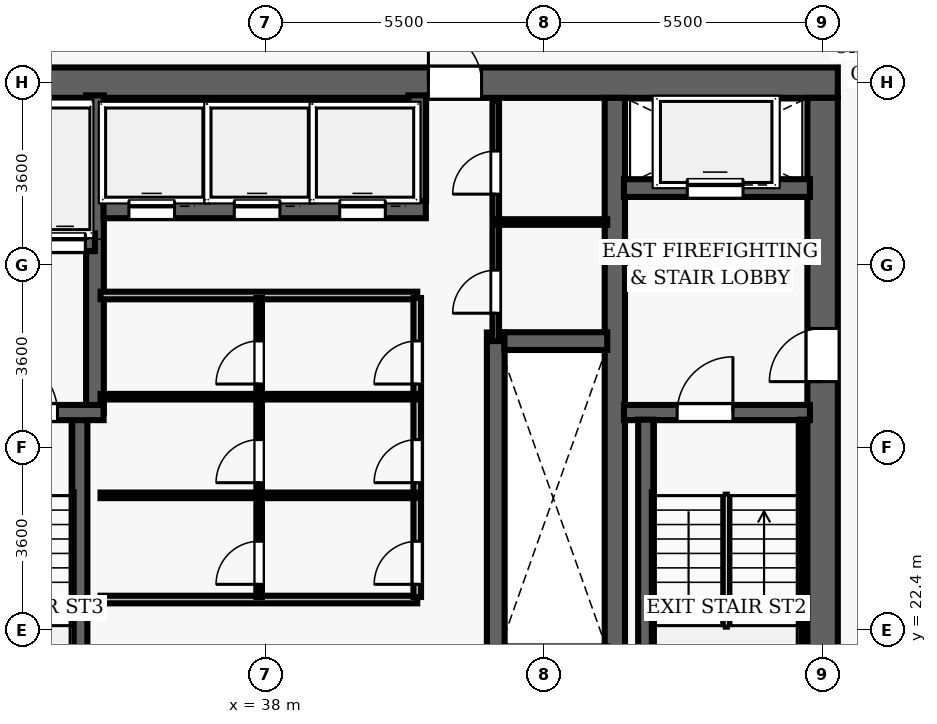
"""IFC4 building model, lengths in metres.
Left out: names, types, materials, properties, quantities, classifications, styles, units other than length and angle.
Written with IfcOpenShell. Run it as: python <this file> out.ifc"""

import sys

from ifc_helpers import new_model, si_unit, direction, frame, frame_2d, origin, place, context, subcontext, project, spatial, rectangle, extrude, element, fill, save


model = new_model("IFC4")
c1 = context("Model", 3, precision=1e-05, world=origin(), true_north=direction((0.0, 1.0)))
c2 = subcontext(c1, "Body", "Model", "MODEL_VIEW")
j1 = project(units=[si_unit("LENGTHUNIT", "METRE"), si_unit("PLANEANGLEUNIT", "RADIAN")], contexts=[c1])
p1 = place(None, origin())
s1 = spatial("IfcSite", under=j1, at=p1, CompositionType="ELEMENT")
p2 = place(p1, origin())
s2 = spatial("IfcBuilding", under=s1, at=p2, CompositionType="ELEMENT")
p3 = place(p2, frame((0.0, 0.0, 90.4)))
s3 = spatial("IfcBuildingStorey", under=s2, at=p3, CompositionType="ELEMENT", Elevation=90.4)
p4 = place(p3, frame((26.7, 33.2, 0.0), z_axis=(0.0, 0.0, 1.0), x_axis=(1.0, 0.0, 0.0)))
e1 = element("IfcWall", 1, at=p4, inside=s3, PredefinedType="SHEAR", context=c2, shape_type="SweptSolid", body=[
    extrude(rectangle(XDim=22.6, YDim=0.6, at=frame_2d((11.3, 0.0))), origin(), (0.0, 0.0, 1.0), 3.5),
])
p5 = place(p4, frame((4.62, 0.0, 0.0)))
e2 = element("IfcOpeningElement", 2, at=p5, cuts=e1, PredefinedType="OPENING", context=c2, shape_type="SweptSolid", body=[
    extrude(rectangle(XDim=1.05, YDim=2.15, at=frame_2d((0.525, 1.075))), frame((0.0, 0.31, 0.0), z_axis=(0.0, -1.0, 0.0), x_axis=(1.0, 0.0, 0.0)), (0.0, 0.0, 1.0), 0.62),
])
p6 = place(p4, frame((14.52, 0.0, 0.0)))
e3 = element("IfcOpeningElement", 3, at=p6, cuts=e1, PredefinedType="OPENING", context=c2, shape_type="SweptSolid", body=[
    extrude(rectangle(XDim=1.05, YDim=2.15, at=frame_2d((0.525, 1.075))), frame((0.0, 0.31, 0.0), z_axis=(0.0, -1.0, 0.0), x_axis=(1.0, 0.0, 0.0)), (0.0, 0.0, 1.0), 0.62),
])
p7 = place(p3, frame((49.0, 19.1, 0.0), z_axis=(0.0, 0.0, 1.0), x_axis=(0.0, 1.0, 0.0)))
e4 = element("IfcWall", 4, at=p7, inside=s3, PredefinedType="SHEAR", context=c2, shape_type="SweptSolid", body=[
    extrude(rectangle(XDim=13.8, YDim=0.6, at=frame_2d((6.9, 0.0))), origin(), (0.0, 0.0, 1.0), 3.5),
])
p8 = place(p7, frame((8.2, 0.0, 0.0)))
e5 = element("IfcOpeningElement", 5, at=p8, cuts=e4, PredefinedType="OPENING", context=c2, shape_type="SweptSolid", body=[
    extrude(rectangle(XDim=1.05, YDim=2.15, at=frame_2d((0.525, 1.075))), frame((0.0, 0.31, 0.0), z_axis=(0.0, -1.0, 0.0), x_axis=(1.0, 0.0, 0.0)), (0.0, 0.0, 1.0), 0.62),
])
p9 = place(p3, frame((44.9, 19.1, 0.0), z_axis=(0.0, 0.0, 1.0), x_axis=(0.0, 1.0, 0.0)))
e6 = element("IfcWall", 6, at=p9, inside=s3, PredefinedType="SHEAR", context=c2, shape_type="SweptSolid", body=[
    extrude(rectangle(XDim=13.8, YDim=0.4, at=frame_2d((6.9, 0.0))), origin(), (0.0, 0.0, 1.0), 3.5),
])
p10 = place(p3, frame((45.08, 26.69, 0.0), z_axis=(0.0, 0.0, 1.0), x_axis=(1.0, 0.0, 0.0)))
e7 = element("IfcWall", 7, at=p10, inside=s3, PredefinedType="SHEAR", context=c2, shape_type="SweptSolid", body=[
    extrude(rectangle(XDim=3.67, YDim=0.3, at=frame_2d((1.835, 0.0))), origin(), (0.0, 0.0, 1.0), 3.5),
])
p11 = place(p10, frame((1.05, 0.0, 0.0)))
e8 = element("IfcOpeningElement", 8, at=p11, cuts=e7, PredefinedType="OPENING", context=c2, shape_type="SweptSolid", body=[
    extrude(rectangle(XDim=1.1, YDim=2.15, at=frame_2d((0.55, 1.075))), frame((0.0, 0.16, 0.0), z_axis=(0.0, -1.0, 0.0), x_axis=(1.0, 0.0, 0.0)), (0.0, 0.0, 1.0), 0.32),
])
p12 = place(p3, frame((45.51, 19.05, 0.0), z_axis=(0.0, 0.0, 1.0), x_axis=(0.0, 1.0, 0.0)))
e9 = element("IfcWall", 9, at=p12, inside=s3, PredefinedType="SHEAR", context=c2, shape_type="SweptSolid", body=[
    extrude(rectangle(XDim=7.5, YDim=0.3, at=frame_2d((3.75, 0.0))), origin(), (0.0, 0.0, 1.0), 3.5),
])
p13 = place(p3, frame((48.605, 19.1, 0.0), z_axis=(0.0, 0.0, 1.0), x_axis=(0.0, 1.0, 0.0)))
e10 = element("IfcWall", 10, at=p13, inside=s3, PredefinedType="SHEAR", context=c2, shape_type="SweptSolid", body=[
    extrude(rectangle(XDim=7.45, YDim=0.12, at=frame_2d((3.725, 0.0))), origin(), (0.0, 0.0, 1.0), 3.5),
])
p14 = place(p3, frame((45.08, 31.12, 0.0), z_axis=(0.0, 0.0, 1.0), x_axis=(1.0, 0.0, 0.0)))
e11 = element("IfcWall", 11, at=p14, inside=s3, PredefinedType="SHEAR", context=c2, shape_type="SweptSolid", body=[
    extrude(rectangle(XDim=3.67, YDim=0.35, at=frame_2d((1.835, 0.0))), origin(), (0.0, 0.0, 1.0), 2.6),
])
p15 = place(p14, frame((1.25, 0.0, 0.0)))
e12 = element("IfcOpeningElement", 12, at=p15, cuts=e11, PredefinedType="OPENING", context=c2, shape_type="SweptSolid", body=[
    extrude(rectangle(XDim=1.1, YDim=2.15, at=frame_2d((0.55, 1.075))), frame((0.0, 0.185, 0.0), z_axis=(0.0, -1.0, 0.0), x_axis=(1.0, 0.0, 0.0)), (0.0, 0.0, 1.0), 0.37),
])
p16 = place(p3, frame((34.34, 19.05, 0.0), z_axis=(0.0, 0.0, 1.0), x_axis=(0.0, 1.0, 0.0)))
e13 = element("IfcWall", 13, at=p16, inside=s3, PredefinedType="SHEAR", context=c2, shape_type="SweptSolid", body=[
    extrude(rectangle(XDim=7.5, YDim=0.3, at=frame_2d((3.75, 0.0))), origin(), (0.0, 0.0, 1.0), 3.5),
])
p17 = place(p3, frame((34.64, 26.69, 0.0), z_axis=(0.0, 0.0, 1.0), x_axis=(0.0, 1.0, 0.0)))
e14 = element("IfcWall", 14, at=p17, inside=s3, PredefinedType="SHEAR", context=c2, shape_type="SweptSolid", body=[
    extrude(rectangle(XDim=6.26, YDim=0.35, at=frame_2d((3.13, 0.0))), origin(), (0.0, 0.0, 1.0), 3.5),
])
p18 = place(p3, frame((31.25, 26.69, 0.0), z_axis=(0.0, 0.0, 1.0), x_axis=(1.0, 0.0, 0.0)))
e15 = element("IfcWall", 15, at=p18, inside=s3, PredefinedType="SHEAR", context=c2, shape_type="SweptSolid", body=[
    extrude(rectangle(XDim=3.56, YDim=0.3, at=frame_2d((1.78, 0.0))), origin(), (0.0, 0.0, 1.0), 3.5),
])
p19 = place(p18, frame((1.55, 0.0, 0.0)))
e16 = element("IfcOpeningElement", 16, at=p19, cuts=e15, PredefinedType="OPENING", context=c2, shape_type="SweptSolid", body=[
    extrude(rectangle(XDim=1.1, YDim=2.15, at=frame_2d((0.55, 1.075))), frame((0.0, 0.16, 0.0), z_axis=(0.0, -1.0, 0.0), x_axis=(1.0, 0.0, 0.0)), (0.0, 0.0, 1.0), 0.32),
])
p20 = place(p3, frame((32.23, 30.05, 0.0), z_axis=(0.0, 0.0, 1.0), x_axis=(1.0, 0.0, 0.0)))
e17 = element("IfcWall", 17, at=p20, inside=s3, PredefinedType="SHEAR", context=c2, shape_type="SweptSolid", body=[
    extrude(rectangle(XDim=2.41, YDim=0.35, at=frame_2d((1.205, 0.0))), origin(), (0.0, 0.0, 1.0), 2.6),
])
p21 = place(p20, frame((0.42, 0.0, 0.0)))
e18 = element("IfcOpeningElement", 18, at=p21, cuts=e17, PredefinedType="OPENING", context=c2, shape_type="SweptSolid", body=[
    extrude(rectangle(XDim=0.8, YDim=2.15, at=frame_2d((0.4, 1.075))), frame((0.0, 0.185, 0.0), z_axis=(0.0, -1.0, 0.0), x_axis=(1.0, 0.0, 0.0)), (0.0, 0.0, 1.0), 0.37),
])
p22 = place(p20, frame((1.42, 0.0, 0.0)))
e19 = element("IfcOpeningElement", 19, at=p22, cuts=e17, PredefinedType="OPENING", context=c2, shape_type="SweptSolid", body=[
    extrude(rectangle(XDim=0.8, YDim=2.15, at=frame_2d((0.4, 1.075))), frame((0.0, 0.185, 0.0), z_axis=(0.0, -1.0, 0.0), x_axis=(1.0, 0.0, 0.0)), (0.0, 0.0, 1.0), 0.37),
])
p23 = place(p3, frame((42.55, 21.73, 0.0), z_axis=(0.0, 0.0, 1.0), x_axis=(0.0, 1.0, 0.0)))
e20 = element("IfcWall", 20, at=p23, inside=s3, PredefinedType="SHEAR", context=c2, shape_type="SweptSolid", body=[
    extrude(rectangle(XDim=6.54, YDim=0.35, at=frame_2d((3.27, 0.0))), origin(), (0.0, 0.0, 1.0), 2.6),
])
p24 = place(p3, frame((42.72, 28.1, 0.0), z_axis=(0.0, 0.0, 1.0), x_axis=(1.0, 0.0, 0.0)))
e21 = element("IfcWall", 21, at=p24, inside=s3, PredefinedType="SHEAR", context=c2, shape_type="SweptSolid", body=[
    extrude(rectangle(XDim=2.03, YDim=0.35, at=frame_2d((1.015, 0.0))), origin(), (0.0, 0.0, 1.0), 2.6),
])
p25 = place(p3, frame((34.81, 30.7, 0.0), z_axis=(0.0, 0.0, 1.0), x_axis=(1.0, 0.0, 0.0)))
e22 = element("IfcWall", 22, at=p25, inside=s3, PredefinedType="SHEAR", context=c2, shape_type="SweptSolid", body=[
    extrude(rectangle(XDim=6.36, YDim=0.35, at=frame_2d((3.18, 0.0))), origin(), (0.0, 0.0, 1.0), 2.6),
])
p26 = place(p25, frame((0.5, 0.0, 0.0)))
e23 = element("IfcOpeningElement", 23, at=p26, cuts=e22, PredefinedType="OPENING", context=c2, shape_type="SweptSolid", body=[
    extrude(rectangle(XDim=0.9, YDim=2.15, at=frame_2d((0.45, 1.075))), frame((0.0, 0.185, 0.0), z_axis=(0.0, -1.0, 0.0), x_axis=(1.0, 0.0, 0.0)), (0.0, 0.0, 1.0), 0.37),
])
p27 = place(p25, frame((2.58, 0.0, 0.0)))
e24 = element("IfcOpeningElement", 24, at=p27, cuts=e22, PredefinedType="OPENING", context=c2, shape_type="SweptSolid", body=[
    extrude(rectangle(XDim=0.9, YDim=2.15, at=frame_2d((0.45, 1.075))), frame((0.0, 0.185, 0.0), z_axis=(0.0, -1.0, 0.0), x_axis=(1.0, 0.0, 0.0)), (0.0, 0.0, 1.0), 0.37),
])
p28 = place(p25, frame((4.66, 0.0, 0.0)))
e25 = element("IfcOpeningElement", 25, at=p28, cuts=e22, PredefinedType="OPENING", context=c2, shape_type="SweptSolid", body=[
    extrude(rectangle(XDim=0.9, YDim=2.15, at=frame_2d((0.45, 1.075))), frame((0.0, 0.185, 0.0), z_axis=(0.0, -1.0, 0.0), x_axis=(1.0, 0.0, 0.0)), (0.0, 0.0, 1.0), 0.37),
])
p29 = place(p3, frame((41.0, 30.87, 0.0), z_axis=(0.0, 0.0, 1.0), x_axis=(0.0, 1.0, 0.0)))
e26 = element("IfcWall", 26, at=p29, inside=s3, PredefinedType="SHEAR", context=c2, shape_type="SweptSolid", body=[
    extrude(rectangle(XDim=2.08, YDim=0.35, at=frame_2d((1.04, 0.0))), origin(), (0.0, 0.0, 1.0), 2.6),
])
for number, where, z_axis, x_axis in (
    (27, (34.75, 29.0, 0.0), (0.0, 0.0, 1.0), (1.0, 0.0, 0.0)),
    (28, (34.75, 23.0, 0.0), (0.0, 0.0, 1.0), (1.0, 0.0, 0.0)),
):
    element("IfcWall", number, at=place(p3, frame(where, z_axis=z_axis, x_axis=x_axis)), inside=s3, PredefinedType="PARTITIONING", context=c2, shape_type="SweptSolid", body=[
        extrude(rectangle(XDim=6.25, YDim=0.15, at=frame_2d((3.125, 0.0))), origin(), (0.0, 0.0, 1.0), 2.6),
    ])
p30 = place(p3, frame((41.0, 23.05, 0.0), z_axis=(0.0, 0.0, 1.0), x_axis=(0.0, 1.0, 0.0)))
e29 = element("IfcWall", 29, at=p30, inside=s3, PredefinedType="PARTITIONING", context=c2, shape_type="SweptSolid", body=[
    extrude(rectangle(XDim=5.9, YDim=0.15, at=frame_2d((2.95, 0.0))), origin(), (0.0, 0.0, 1.0), 2.6),
])
p31 = place(p30, frame((0.25, 0.0, 0.0)))
e30 = element("IfcOpeningElement", 30, at=p31, cuts=e29, PredefinedType="OPENING", context=c2, shape_type="SweptSolid", body=[
    extrude(rectangle(XDim=0.85, YDim=2.1, at=frame_2d((0.425, 1.05))), frame((0.0, 0.085, 0.0), z_axis=(0.0, -1.0, 0.0), x_axis=(1.0, 0.0, 0.0)), (0.0, 0.0, 1.0), 0.17),
])
p32 = place(p30, frame((2.256, 0.0, 0.0)))
e31 = element("IfcOpeningElement", 31, at=p32, cuts=e29, PredefinedType="OPENING", context=c2, shape_type="SweptSolid", body=[
    extrude(rectangle(XDim=0.85, YDim=2.1, at=frame_2d((0.425, 1.05))), frame((0.0, 0.085, 0.0), z_axis=(0.0, -1.0, 0.0), x_axis=(1.0, 0.0, 0.0)), (0.0, 0.0, 1.0), 0.17),
])
p33 = place(p30, frame((4.203, 0.0, 0.0)))
e32 = element("IfcOpeningElement", 32, at=p33, cuts=e29, PredefinedType="OPENING", context=c2, shape_type="SweptSolid", body=[
    extrude(rectangle(XDim=0.85, YDim=2.1, at=frame_2d((0.425, 1.05))), frame((0.0, 0.085, 0.0), z_axis=(0.0, -1.0, 0.0), x_axis=(1.0, 0.0, 0.0)), (0.0, 0.0, 1.0), 0.17),
])
p34 = place(p3, frame((37.88, 23.05, 0.0), z_axis=(0.0, 0.0, 1.0), x_axis=(0.0, 1.0, 0.0)))
e33 = element("IfcWall", 33, at=p34, inside=s3, PredefinedType="PARTITIONING", context=c2, shape_type="SweptSolid", body=[
    extrude(rectangle(XDim=5.9, YDim=0.11, at=frame_2d((2.95, 0.0))), origin(), (0.0, 0.0, 1.0), 2.6),
])
p35 = place(p34, frame((0.25, 0.0, 0.0)))
e34 = element("IfcOpeningElement", 34, at=p35, cuts=e33, PredefinedType="OPENING", context=c2, shape_type="SweptSolid", body=[
    extrude(rectangle(XDim=0.85, YDim=2.1, at=frame_2d((0.425, 1.05))), frame((0.0, 0.065, 0.0), z_axis=(0.0, -1.0, 0.0), x_axis=(1.0, 0.0, 0.0)), (0.0, 0.0, 1.0), 0.13),
])
p36 = place(p34, frame((2.256, 0.0, 0.0)))
e35 = element("IfcOpeningElement", 35, at=p36, cuts=e33, PredefinedType="OPENING", context=c2, shape_type="SweptSolid", body=[
    extrude(rectangle(XDim=0.85, YDim=2.1, at=frame_2d((0.425, 1.05))), frame((0.0, 0.065, 0.0), z_axis=(0.0, -1.0, 0.0), x_axis=(1.0, 0.0, 0.0)), (0.0, 0.0, 1.0), 0.13),
])
p37 = place(p34, frame((4.203, 0.0, 0.0)))
e36 = element("IfcOpeningElement", 36, at=p37, cuts=e33, PredefinedType="OPENING", context=c2, shape_type="SweptSolid", body=[
    extrude(rectangle(XDim=0.85, YDim=2.1, at=frame_2d((0.425, 1.05))), frame((0.0, 0.065, 0.0), z_axis=(0.0, -1.0, 0.0), x_axis=(1.0, 0.0, 0.0)), (0.0, 0.0, 1.0), 0.13),
])
for number, where, z_axis, x_axis in (
    (37, (34.75, 25.056, 0.0), (0.0, 0.0, 1.0), (1.0, 0.0, 0.0)),
    (38, (34.75, 27.003, 0.0), (0.0, 0.0, 1.0), (1.0, 0.0, 0.0)),
):
    element("IfcWall", number, at=place(p3, frame(where, z_axis=z_axis, x_axis=x_axis)), inside=s3, PredefinedType="PARTITIONING", context=c2, shape_type="SweptSolid", body=[
        extrude(rectangle(XDim=6.25, YDim=0.11, at=frame_2d((3.125, 0.0))), origin(), (0.0, 0.0, 1.0), 2.6),
    ])
p38 = place(p3, frame((42.55, 28.1, 0.0), z_axis=(0.0, 0.0, 1.0), x_axis=(0.0, 1.0, 0.0)))
e39 = element("IfcWall", 39, at=p38, inside=s3, PredefinedType="PARTITIONING", context=c2, shape_type="SweptSolid", body=[
    extrude(rectangle(XDim=4.75, YDim=0.13, at=frame_2d((2.375, 0.0))), origin(), (0.0, 0.0, 1.0), 2.6),
])
p39 = place(p38, frame((0.55, 0.0, 0.0)))
e40 = element("IfcOpeningElement", 40, at=p39, cuts=e39, PredefinedType="OPENING", context=c2, shape_type="SweptSolid", body=[
    extrude(rectangle(XDim=0.85, YDim=2.1, at=frame_2d((0.425, 1.05))), frame((0.0, 0.075, 0.0), z_axis=(0.0, -1.0, 0.0), x_axis=(1.0, 0.0, 0.0)), (0.0, 0.0, 1.0), 0.15),
])
p40 = place(p38, frame((2.9, 0.0, 0.0)))
e41 = element("IfcOpeningElement", 41, at=p40, cuts=e39, PredefinedType="OPENING", context=c2, shape_type="SweptSolid", body=[
    extrude(rectangle(XDim=0.85, YDim=2.1, at=frame_2d((0.425, 1.05))), frame((0.0, 0.075, 0.0), z_axis=(0.0, -1.0, 0.0), x_axis=(1.0, 0.0, 0.0)), (0.0, 0.0, 1.0), 0.15),
])
p41 = place(p3, frame((42.55, 30.45, 0.0), z_axis=(0.0, 0.0, 1.0), x_axis=(1.0, 0.0, 0.0)))
e42 = element("IfcWall", 42, at=p41, inside=s3, PredefinedType="PARTITIONING", context=c2, shape_type="SweptSolid", body=[
    extrude(rectangle(XDim=2.2, YDim=0.11, at=frame_2d((1.1, 0.0))), origin(), (0.0, 0.0, 1.0), 2.6),
])
p42 = place(p11, origin())
e43 = element("IfcDoor", 43, at=p42, inside=s3, OperationType="SINGLE_SWING_RIGHT", PredefinedType="DOOR", context=c2, shape_type="SweptSolid", body=[
    extrude(rectangle(XDim=1.1, YDim=2.15, at=frame_2d((0.55, 1.075))), frame((0.0, 0.025, 0.0), z_axis=(0.0, -1.0, 0.0), x_axis=(1.0, 0.0, 0.0)), (0.0, 0.0, 1.0), 0.05),
])
fill(e8, e43)
p43 = place(p8, origin())
e44 = element("IfcDoor", 44, at=p43, inside=s3, OperationType="SINGLE_SWING_LEFT", PredefinedType="DOOR", context=c2, shape_type="SweptSolid", body=[
    extrude(rectangle(XDim=1.05, YDim=2.15, at=frame_2d((0.525, 1.075))), frame((0.0, 0.025, 0.0), z_axis=(0.0, -1.0, 0.0), x_axis=(1.0, 0.0, 0.0)), (0.0, 0.0, 1.0), 0.05),
])
fill(e5, e44)
p44 = place(p19, origin())
e45 = element("IfcDoor", 45, at=p44, inside=s3, OperationType="SINGLE_SWING_LEFT", PredefinedType="DOOR", context=c2, shape_type="SweptSolid", body=[
    extrude(rectangle(XDim=1.1, YDim=2.15, at=frame_2d((0.55, 1.075))), frame((0.0, 0.025, 0.0), z_axis=(0.0, -1.0, 0.0), x_axis=(1.0, 0.0, 0.0)), (0.0, 0.0, 1.0), 0.05),
])
fill(e16, e45)
p45 = place(p6, origin())
e46 = element("IfcDoor", 46, at=p45, inside=s3, OperationType="SINGLE_SWING_LEFT", PredefinedType="DOOR", context=c2, shape_type="SweptSolid", body=[
    extrude(rectangle(XDim=1.05, YDim=2.15, at=frame_2d((0.525, 1.075))), frame((0.0, 0.025, 0.0), z_axis=(0.0, -1.0, 0.0), x_axis=(1.0, 0.0, 0.0)), (0.0, 0.0, 1.0), 0.05),
])
fill(e3, e46)
p46 = place(p31, origin())
e47 = element("IfcDoor", 47, at=p46, inside=s3, OperationType="SINGLE_SWING_LEFT", PredefinedType="DOOR", context=c2, shape_type="SweptSolid", body=[
    extrude(rectangle(XDim=0.85, YDim=2.1, at=frame_2d((0.425, 1.05))), frame((0.0, 0.025, 0.0), z_axis=(0.0, -1.0, 0.0), x_axis=(1.0, 0.0, 0.0)), (0.0, 0.0, 1.0), 0.05),
])
fill(e30, e47)
p47 = place(p35, origin())
e48 = element("IfcDoor", 48, at=p47, inside=s3, OperationType="SINGLE_SWING_LEFT", PredefinedType="DOOR", context=c2, shape_type="SweptSolid", body=[
    extrude(rectangle(XDim=0.85, YDim=2.1, at=frame_2d((0.425, 1.05))), frame((0.0, 0.025, 0.0), z_axis=(0.0, -1.0, 0.0), x_axis=(1.0, 0.0, 0.0)), (0.0, 0.0, 1.0), 0.05),
])
fill(e34, e48)
p48 = place(p32, origin())
e49 = element("IfcDoor", 49, at=p48, inside=s3, OperationType="SINGLE_SWING_LEFT", PredefinedType="DOOR", context=c2, shape_type="SweptSolid", body=[
    extrude(rectangle(XDim=0.85, YDim=2.1, at=frame_2d((0.425, 1.05))), frame((0.0, 0.025, 0.0), z_axis=(0.0, -1.0, 0.0), x_axis=(1.0, 0.0, 0.0)), (0.0, 0.0, 1.0), 0.05),
])
fill(e31, e49)
p49 = place(p36, origin())
e50 = element("IfcDoor", 50, at=p49, inside=s3, OperationType="SINGLE_SWING_LEFT", PredefinedType="DOOR", context=c2, shape_type="SweptSolid", body=[
    extrude(rectangle(XDim=0.85, YDim=2.1, at=frame_2d((0.425, 1.05))), frame((0.0, 0.025, 0.0), z_axis=(0.0, -1.0, 0.0), x_axis=(1.0, 0.0, 0.0)), (0.0, 0.0, 1.0), 0.05),
])
fill(e35, e50)
p50 = place(p33, origin())
e51 = element("IfcDoor", 51, at=p50, inside=s3, OperationType="SINGLE_SWING_LEFT", PredefinedType="DOOR", context=c2, shape_type="SweptSolid", body=[
    extrude(rectangle(XDim=0.85, YDim=2.1, at=frame_2d((0.425, 1.05))), frame((0.0, 0.025, 0.0), z_axis=(0.0, -1.0, 0.0), x_axis=(1.0, 0.0, 0.0)), (0.0, 0.0, 1.0), 0.05),
])
fill(e32, e51)
p51 = place(p37, origin())
e52 = element("IfcDoor", 52, at=p51, inside=s3, OperationType="SINGLE_SWING_LEFT", PredefinedType="DOOR", context=c2, shape_type="SweptSolid", body=[
    extrude(rectangle(XDim=0.85, YDim=2.1, at=frame_2d((0.425, 1.05))), frame((0.0, 0.025, 0.0), z_axis=(0.0, -1.0, 0.0), x_axis=(1.0, 0.0, 0.0)), (0.0, 0.0, 1.0), 0.05),
])
fill(e36, e52)
p52 = place(p39, origin())
e53 = element("IfcDoor", 53, at=p52, inside=s3, OperationType="SINGLE_SWING_LEFT", PredefinedType="DOOR", context=c2, shape_type="SweptSolid", body=[
    extrude(rectangle(XDim=0.85, YDim=2.1, at=frame_2d((0.425, 1.05))), frame((0.0, 0.025, 0.0), z_axis=(0.0, -1.0, 0.0), x_axis=(1.0, 0.0, 0.0)), (0.0, 0.0, 1.0), 0.05),
])
fill(e40, e53)
p53 = place(p40, origin())
e54 = element("IfcDoor", 54, at=p53, inside=s3, OperationType="SINGLE_SWING_LEFT", PredefinedType="DOOR", context=c2, shape_type="SweptSolid", body=[
    extrude(rectangle(XDim=0.85, YDim=2.1, at=frame_2d((0.425, 1.05))), frame((0.0, 0.025, 0.0), z_axis=(0.0, -1.0, 0.0), x_axis=(1.0, 0.0, 0.0)), (0.0, 0.0, 1.0), 0.05),
])
fill(e41, e54)
p54 = place(p26, origin())
e55 = element("IfcDoor", 55, at=p54, inside=s3, OperationType="SLIDING_TO_LEFT", PredefinedType="DOOR", context=c2, shape_type="SweptSolid", body=[
    extrude(rectangle(XDim=0.9, YDim=2.15, at=frame_2d((0.45, 1.075))), frame((0.0, 0.025, 0.0), z_axis=(0.0, -1.0, 0.0), x_axis=(1.0, 0.0, 0.0)), (0.0, 0.0, 1.0), 0.05),
])
fill(e23, e55)
p55 = place(p27, origin())
e56 = element("IfcDoor", 56, at=p55, inside=s3, OperationType="SLIDING_TO_LEFT", PredefinedType="DOOR", context=c2, shape_type="SweptSolid", body=[
    extrude(rectangle(XDim=0.9, YDim=2.15, at=frame_2d((0.45, 1.075))), frame((0.0, 0.025, 0.0), z_axis=(0.0, -1.0, 0.0), x_axis=(1.0, 0.0, 0.0)), (0.0, 0.0, 1.0), 0.05),
])
fill(e24, e56)
p56 = place(p28, origin())
e57 = element("IfcDoor", 57, at=p56, inside=s3, OperationType="SLIDING_TO_LEFT", PredefinedType="DOOR", context=c2, shape_type="SweptSolid", body=[
    extrude(rectangle(XDim=0.9, YDim=2.15, at=frame_2d((0.45, 1.075))), frame((0.0, 0.025, 0.0), z_axis=(0.0, -1.0, 0.0), x_axis=(1.0, 0.0, 0.0)), (0.0, 0.0, 1.0), 0.05),
])
fill(e25, e57)
p57 = place(p15, origin())
e58 = element("IfcDoor", 58, at=p57, inside=s3, OperationType="SLIDING_TO_LEFT", PredefinedType="DOOR", context=c2, shape_type="SweptSolid", body=[
    extrude(rectangle(XDim=1.1, YDim=2.15, at=frame_2d((0.55, 1.075))), frame((0.0, 0.025, 0.0), z_axis=(0.0, -1.0, 0.0), x_axis=(1.0, 0.0, 0.0)), (0.0, 0.0, 1.0), 0.05),
])
fill(e12, e58)
p58 = place(p22, origin())
e59 = element("IfcDoor", 59, at=p58, inside=s3, OperationType="SLIDING_TO_LEFT", PredefinedType="DOOR", context=c2, shape_type="SweptSolid", body=[
    extrude(rectangle(XDim=0.8, YDim=2.15, at=frame_2d((0.4, 1.075))), frame((0.0, 0.025, 0.0), z_axis=(0.0, -1.0, 0.0), x_axis=(1.0, 0.0, 0.0)), (0.0, 0.0, 1.0), 0.05),
])
fill(e19, e59)
save(model, sys.argv[1])
